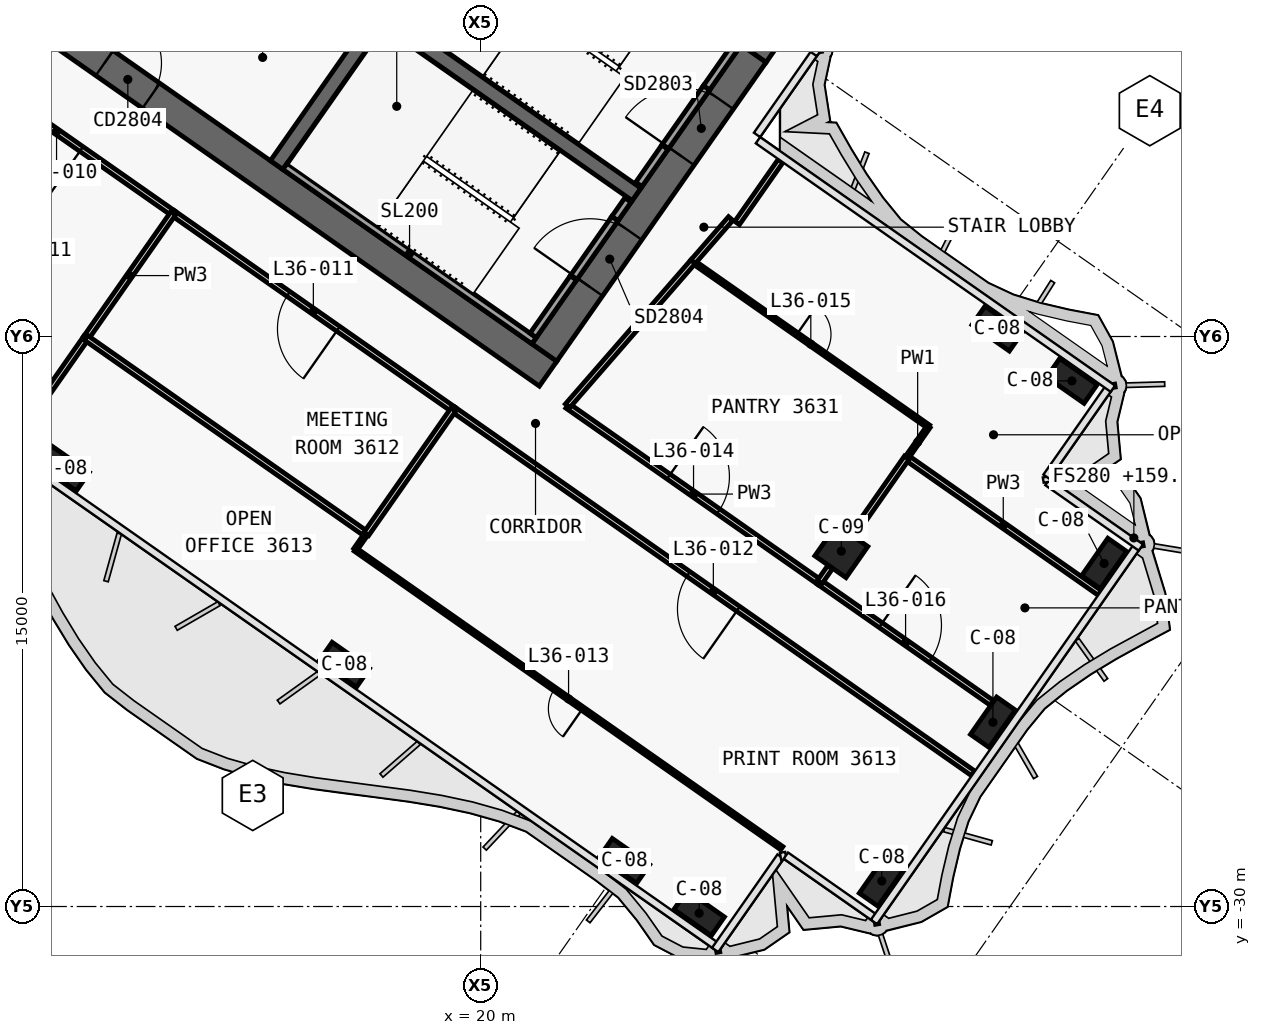
"""IFC4 building model, lengths in metres.
Left out: names, types, materials, properties, quantities, classifications, styles, units other than length and angle.
Written with IfcOpenShell. Run it as: python <this file> out.ifc"""

import sys

from ifc_helpers import new_model, si_unit, direction, frame, frame_2d, origin, origin_2d, place, context, subcontext, project, spatial, polyline, rectangle, outline, extrude, element, fill, save


model = new_model("IFC4")
c1 = context("Model", 3, precision=1e-05, world=origin(), true_north=direction((0.0, 1.0)))
c2 = subcontext(c1, "Body", "Model", "MODEL_VIEW")
j1 = project(units=[si_unit("LENGTHUNIT", "METRE"), si_unit("PLANEANGLEUNIT", "RADIAN")], contexts=[c1])
p1 = place(None, origin())
s1 = spatial("IfcSite", under=j1, at=p1, CompositionType="ELEMENT")
p2 = place(p1, origin())
s2 = spatial("IfcBuilding", under=s1, at=p2, CompositionType="ELEMENT")
p3 = place(p2, frame((0.0, 0.0, 159.3)))
s3 = spatial("IfcBuildingStorey", under=s2, at=p3, CompositionType="ELEMENT", Elevation=159.3)
p4 = place(p3, frame((-0.029, 11.984, 0.0), z_axis=(0.0, 0.0, 1.0), x_axis=(0.819151382952, -0.573577380837, 0.0)))
e1 = element("IfcWall", 1, at=p4, inside=s3, PredefinedType="SHEAR", context=c2, shape_type="SweptSolid", body=[
    extrude(outline(polyline([(33.898, 0.4), (-0.0, 0.4), (0.56, -0.4), (33.898, -0.4), (33.898, 0.4)])), origin(), (0.0, 0.0, 1.0), 3.9),
])
p5 = place(p3, frame((-0.029, -0.712, 0.0), z_axis=(0.0, 0.0, 1.0), x_axis=(0.819151758019, -0.573576845187, 0.0)))
e2 = element("IfcWall", 2, at=p5, inside=s3, PredefinedType="SHEAR", context=c2, shape_type="SweptSolid", body=[
    extrude(outline(polyline([(26.616, 0.4), (-0.0, 0.4), (0.56, -0.4), (26.616, -0.4), (26.616, 0.4)])), origin(), (0.0, 0.0, 1.0), 3.9),
])
p6 = place(p5, frame((0.966, 0.0, 0.0)))
e3 = element("IfcOpeningElement", 3, at=p6, cuts=e2, PredefinedType="OPENING", context=c2, shape_type="SweptSolid", body=[
    extrude(rectangle(XDim=1.5, YDim=2.1, at=frame_2d((0.75, 1.05))), frame((0.0, 0.41, 0.0), z_axis=(0.0, -1.0, 0.0), x_axis=(1.0, 0.0, 0.0)), (0.0, 0.0, 1.0), 0.82),
])
p7 = place(p5, frame((12.366, 0.0, 0.0)))
e4 = element("IfcOpeningElement", 4, at=p7, cuts=e2, PredefinedType="OPENING", context=c2, shape_type="SweptSolid", body=[
    extrude(rectangle(XDim=1.5, YDim=2.1, at=frame_2d((0.75, 1.05))), frame((0.0, 0.41, 0.0), z_axis=(0.0, -1.0, 0.0), x_axis=(1.0, 0.0, 0.0)), (0.0, 0.0, 1.0), 0.82),
])
p8 = place(p3, frame((21.675, -15.421, 0.0), z_axis=(0.0, 0.0, 1.0), x_axis=(0.573581815061, 0.819148278049, 0.0)))
e5 = element("IfcWall", 5, at=p8, inside=s3, PredefinedType="SHEAR", context=c2, shape_type="SweptSolid", body=[
    extrude(outline(polyline([(9.6, 0.4), (0.0, 0.4), (0.0, -0.4), (9.6, -0.4), (9.6, 0.4)])), origin(), (0.0, 0.0, 1.0), 3.9),
])
p9 = place(p8, frame((6.3, 0.0, 0.0)))
e6 = element("IfcOpeningElement", 6, at=p9, cuts=e5, PredefinedType="OPENING", context=c2, shape_type="SweptSolid", body=[
    extrude(rectangle(XDim=1.8, YDim=2.1, at=frame_2d((0.9, 1.05))), frame((0.0, 0.41, 0.0), z_axis=(0.0, -1.0, 0.0), x_axis=(1.0, 0.0, 0.0)), (0.0, 0.0, 1.0), 0.82),
])
p10 = place(p8, frame((2.1, 0.0, 0.0)))
e7 = element("IfcOpeningElement", 7, at=p10, cuts=e5, PredefinedType="OPENING", context=c2, shape_type="SweptSolid", body=[
    extrude(rectangle(XDim=1.8, YDim=2.1, at=frame_2d((0.9, 1.05))), frame((0.0, 0.41, 0.0), z_axis=(0.0, -1.0, 0.0), x_axis=(1.0, 0.0, 0.0)), (0.0, 0.0, 1.0), 0.82),
])
p11 = place(p3, frame((14.63, -10.488, 0.0), z_axis=(0.0, 0.0, 1.0), x_axis=(0.573611936273, 0.819127185829, 0.0)))
e8 = element("IfcWall", 8, at=p11, inside=s3, PredefinedType="SHEAR", context=c2, shape_type="SweptSolid", body=[
    extrude(outline(polyline([(0.0, 0.2), (0.0, -0.2), (4.6, -0.2), (4.6, 0.2), (0.0, 0.2)])), origin(), (0.0, 0.0, 1.0), 3.9),
])
p12 = place(p3, frame((2.638, 3.768, 0.0), z_axis=(0.0, 0.0, 1.0), x_axis=(0.81915267502, -0.573575535572, 0.0)))
e9 = element("IfcWall", 9, at=p12, inside=s3, PredefinedType="SHEAR", context=c2, shape_type="SweptSolid", body=[
    extrude(outline(polyline([(0.0, 0.2), (0.0, -0.2), (26.2, -0.2), (26.2, 0.2), (0.0, 0.2)])), origin(), (0.0, 0.0, 1.0), 3.9),
])
p13 = place(p12, frame((9.637, 0.0, 0.0)))
e10 = element("IfcOpeningElement", 10, at=p13, cuts=e9, PredefinedType="OPENING", context=c2, shape_type="SweptSolid", body=[
    extrude(rectangle(XDim=1.2, YDim=2.1, at=frame_2d((0.6, 1.05))), frame((0.0, 0.21, 0.0), z_axis=(0.0, -1.0, 0.0), x_axis=(1.0, 0.0, 0.0)), (0.0, 0.0, 1.0), 0.42),
])
p14 = place(p12, frame((11.812, 0.0, 0.0)))
e11 = element("IfcOpeningElement", 11, at=p14, cuts=e9, PredefinedType="OPENING", context=c2, shape_type="SweptSolid", body=[
    extrude(rectangle(XDim=1.2, YDim=2.1, at=frame_2d((0.6, 1.05))), frame((0.0, 0.21, 0.0), z_axis=(0.0, -1.0, 0.0), x_axis=(1.0, 0.0, 0.0)), (0.0, 0.0, 1.0), 0.42),
])
p15 = place(p12, frame((13.988, 0.0, 0.0)))
e12 = element("IfcOpeningElement", 12, at=p15, cuts=e9, PredefinedType="OPENING", context=c2, shape_type="SweptSolid", body=[
    extrude(rectangle(XDim=1.2, YDim=2.1, at=frame_2d((0.6, 1.05))), frame((0.0, 0.21, 0.0), z_axis=(0.0, -1.0, 0.0), x_axis=(1.0, 0.0, 0.0)), (0.0, 0.0, 1.0), 0.42),
])
p16 = place(p12, frame((16.262, 0.0, 0.0)))
e13 = element("IfcOpeningElement", 13, at=p16, cuts=e9, PredefinedType="OPENING", context=c2, shape_type="SweptSolid", body=[
    extrude(rectangle(XDim=1.0, YDim=2.1, at=frame_2d((0.5, 1.05))), frame((0.0, 0.21, 0.0), z_axis=(0.0, -1.0, 0.0), x_axis=(1.0, 0.0, 0.0)), (0.0, 0.0, 1.0), 0.42),
])
for number, where, z_axis, x_axis in (
    (14, (9.038, -18.475, 0.0), (0.0, 0.0, 1.0), (0.819, -0.574, 0.0)),
    (15, (16.41, -23.637, 0.0), (0.0, 0.0, 1.0), (0.819, -0.574, 0.0)),
    (16, (23.782, -28.799, 0.0), (0.0, 0.0, 1.0), (0.819, -0.574, 0.0)),
    (17, (25.748, -30.176, 0.0), (0.0, 0.0, 1.0), (0.819, -0.574, 0.0)),
    (18, (33.591, -14.792, 0.0), (0.0, 0.0, 1.0), (0.819, -0.574, 0.0)),
    (19, (35.556, -16.168, 0.0), (0.0, 0.0, 1.0), (0.819, -0.574, 0.0)),
    (20, (30.553, -29.329, 0.0), (0.0, 0.0, 1.0), (0.574, 0.819, 0.0)),
    (21, (33.479, -25.151, 0.0), (0.0, 0.0, 1.0), (0.574, 0.819, 0.0)),
    (22, (36.404, -20.973, 0.0), (0.0, 0.0, 1.0), (0.574, 0.819, 0.0)),
):
    element("IfcColumn", number, at=place(p3, frame(where, z_axis=z_axis, x_axis=x_axis)), inside=s3, PredefinedType="COLUMN", context=c2, shape_type="SweptSolid", body=[
        extrude(rectangle(XDim=1.2, YDim=0.6, at=origin_2d()), origin(), (0.0, 0.0, 1.0), 3.9),
    ])
p17 = place(p3, frame((29.49, -20.649, 0.0), z_axis=(0.0, 0.0, 1.0), x_axis=(0.819152044289, -0.573576436351, 0.0)))
e23 = element("IfcColumn", 23, at=p17, inside=s3, PredefinedType="COLUMN", context=c2, shape_type="SweptSolid", body=[
    extrude(rectangle(XDim=1.0, YDim=1.0, at=origin_2d()), origin(), (0.0, 0.0, 1.0), 3.9),
])
p18 = place(p3, frame((24.162, -10.998, 0.0), z_axis=(0.0, 0.0, 1.0), x_axis=(0.573612502218, 0.819126789514, 0.0)))
e24 = element("IfcWall", 24, at=p18, inside=s3, PredefinedType="SOLIDWALL", context=c2, shape_type="SweptSolid", body=[
    extrude(rectangle(XDim=1.2, YDim=0.2, at=frame_2d((0.6, 0.0))), origin(), (0.0, 0.0, 1.0), 3.62),
])
p19 = place(p3, frame((25.94, -8.458, 0.0), z_axis=(0.0, 0.0, 1.0), x_axis=(0.573619628835, 0.819121798889, 0.0)))
e25 = element("IfcWall", 25, at=p19, inside=s3, PredefinedType="SOLIDWALL", context=c2, shape_type="SweptSolid", body=[
    extrude(rectangle(XDim=1.25, YDim=0.2, at=frame_2d((0.625, 0.0))), origin(), (0.0, 0.0, 1.0), 3.62),
])
p20 = place(p3, frame((24.85, -10.014, 2.15), z_axis=(0.0, 0.0, 1.0), x_axis=(0.573505465124, 0.819201734296, 0.0)))
e26 = element("IfcWall", 26, at=p20, inside=s3, PredefinedType="SOLIDWALL", context=c2, shape_type="SweptSolid", body=[
    extrude(rectangle(XDim=1.9, YDim=0.2, at=frame_2d((0.95, 0.0))), origin(), (0.0, 0.0, 1.0), 1.47),
])
p21 = place(p3, frame((14.851, -10.521, 0.0), z_axis=(0.0, 0.0, 1.0), x_axis=(0.819141584393, -0.57359137434, 0.0)))
e27 = element("IfcWall", 27, at=p21, inside=s3, PredefinedType="SOLIDWALL", context=c2, shape_type="SweptSolid", body=[
    extrude(rectangle(XDim=8.0, YDim=0.2, at=frame_2d((4.0, 0.0))), origin(), (0.0, 0.0, 1.0), 3.62),
])
p22 = place(p3, frame((21.38, -14.97, 0.0), z_axis=(0.0, 0.0, 1.0), x_axis=(0.573559770908, 0.819163713305, 0.0)))
e28 = element("IfcWall", 28, at=p22, inside=s3, PredefinedType="SOLIDWALL", context=c2, shape_type="SweptSolid", body=[
    extrude(rectangle(XDim=1.85, YDim=0.2, at=frame_2d((0.925, 0.0))), origin(), (0.0, 0.0, 1.0), 3.62),
])
p23 = place(p3, frame((23.531, -11.898, 0.0), z_axis=(0.0, 0.0, 1.0), x_axis=(0.573708088123, 0.819059844958, 0.0)))
e29 = element("IfcWall", 29, at=p23, inside=s3, PredefinedType="SOLIDWALL", context=c2, shape_type="SweptSolid", body=[
    extrude(rectangle(XDim=0.6, YDim=0.2, at=frame_2d((0.3, 0.0))), origin(), (0.0, 0.0, 1.0), 3.62),
])
p24 = place(p3, frame((22.441, -13.455, 2.15), z_axis=(0.0, 0.0, 1.0), x_axis=(0.573591692345, 0.819141361715, 0.0)))
e30 = element("IfcWall", 30, at=p24, inside=s3, PredefinedType="SOLIDWALL", context=c2, shape_type="SweptSolid", body=[
    extrude(rectangle(XDim=1.9, YDim=0.2, at=frame_2d((0.95, 0.0))), origin(), (0.0, 0.0, 1.0), 1.47),
])
p25 = place(p3, frame((22.283, -16.824, 0.0), z_axis=(0.0, 0.0, 1.0), x_axis=(0.819158271121, -0.57356754341, 0.0)))
e31 = element("IfcWall", 31, at=p25, inside=s3, PredefinedType="PARTITIONING", context=c2, shape_type="SweptSolid", body=[
    extrude(rectangle(XDim=8.099, YDim=0.15, at=frame_2d((4.049, 0.0))), origin(), (0.0, 0.0, 1.0), 3.0),
])
p26 = place(p25, frame((3.25, 0.0, 0.0)))
e32 = element("IfcOpeningElement", 32, at=p26, cuts=e31, PredefinedType="OPENING", context=c2, shape_type="SweptSolid", body=[
    extrude(rectangle(XDim=1.6, YDim=2.1, at=frame_2d((0.8, 1.05))), frame((0.0, 0.085, 0.0), z_axis=(0.0, -1.0, 0.0), x_axis=(1.0, 0.0, 0.0)), (0.0, 0.0, 1.0), 0.17),
])
p27 = place(p3, frame((28.914, -21.467, 0.0), z_axis=(0.0, 0.0, 1.0), x_axis=(0.819142757108, -0.573589699592, 0.0)))
e33 = element("IfcWall", 33, at=p27, inside=s3, PredefinedType="PARTITIONING", context=c2, shape_type="SweptSolid", body=[
    extrude(rectangle(XDim=5.532, YDim=0.15, at=frame_2d((2.766, 0.0))), origin(), (0.0, 0.0, 1.0), 3.0),
])
p28 = place(p27, frame((1.966, 0.0, 0.0)))
e34 = element("IfcOpeningElement", 34, at=p28, cuts=e33, PredefinedType="OPENING", context=c2, shape_type="SweptSolid", body=[
    extrude(rectangle(XDim=1.6, YDim=2.1, at=frame_2d((0.8, 1.05))), frame((0.0, 0.085, 0.0), z_axis=(0.0, -1.0, 0.0), x_axis=(1.0, 0.0, 0.0)), (0.0, 0.0, 1.0), 0.17),
])
p29 = place(p3, frame((11.912, -11.759, 0.0), z_axis=(0.0, 0.0, 1.0), x_axis=(-0.819150881364, 0.573578097177, 0.0)))
e35 = element("IfcWall", 35, at=p29, inside=s3, PredefinedType="PARTITIONING", context=c2, shape_type="SweptSolid", body=[
    extrude(rectangle(XDim=7.502, YDim=0.15, at=frame_2d((3.751, 0.0))), origin(), (0.0, 0.0, 1.0), 3.0),
])
p30 = place(p29, frame((2.951, 0.0, 0.0)))
e36 = element("IfcOpeningElement", 36, at=p30, cuts=e35, PredefinedType="OPENING", context=c2, shape_type="SweptSolid", body=[
    extrude(rectangle(XDim=1.6, YDim=2.1, at=frame_2d((0.8, 1.05))), frame((0.0, 0.085, 0.0), z_axis=(0.0, -1.0, 0.0), x_axis=(1.0, 0.0, 0.0)), (0.0, 0.0, 1.0), 0.17),
])
p31 = place(p3, frame((19.284, -16.921, 0.0), z_axis=(0.0, 0.0, 1.0), x_axis=(-0.819155480642, 0.5735715287, 0.0)))
e37 = element("IfcWall", 37, at=p31, inside=s3, PredefinedType="PARTITIONING", context=c2, shape_type="SweptSolid", body=[
    extrude(rectangle(XDim=9.004, YDim=0.15, at=frame_2d((4.502, 0.0))), origin(), (0.0, 0.0, 1.0), 3.0),
])
p32 = place(p31, frame((3.702, 0.0, 0.0)))
e38 = element("IfcOpeningElement", 38, at=p32, cuts=e37, PredefinedType="OPENING", context=c2, shape_type="SweptSolid", body=[
    extrude(rectangle(XDim=1.6, YDim=2.1, at=frame_2d((0.8, 1.05))), frame((0.0, 0.085, 0.0), z_axis=(0.0, -1.0, 0.0), x_axis=(1.0, 0.0, 0.0)), (0.0, 0.0, 1.0), 0.17),
])
p33 = place(p3, frame((32.962, -26.499, 0.0), z_axis=(0.0, 0.0, 1.0), x_axis=(-0.819151565135, 0.573577120654, 0.0)))
e39 = element("IfcWall", 39, at=p33, inside=s3, PredefinedType="PARTITIONING", context=c2, shape_type="SweptSolid", body=[
    extrude(rectangle(XDim=16.702, YDim=0.15, at=frame_2d((8.351, 0.0))), origin(), (0.0, 0.0, 1.0), 2.9),
])
p34 = place(p33, frame((7.551, 0.0, 0.0)))
e40 = element("IfcOpeningElement", 40, at=p34, cuts=e39, PredefinedType="OPENING", context=c2, shape_type="SweptSolid", body=[
    extrude(rectangle(XDim=1.6, YDim=2.1, at=frame_2d((0.8, 1.05))), frame((0.0, 0.085, 0.0), z_axis=(0.0, -1.0, 0.0), x_axis=(1.0, 0.0, 0.0)), (0.0, 0.0, 1.0), 0.17),
])
p35 = place(p3, frame((31.784, -17.371, 0.0), z_axis=(0.0, 0.0, 1.0), x_axis=(-0.573708088123, -0.819059844958, 0.0)))
e41 = element("IfcWall", 41, at=p35, inside=s3, PredefinedType="PARTITIONING", context=c2, shape_type="SweptSolid", body=[
    extrude(rectangle(XDim=1.0, YDim=0.1, at=frame_2d((0.5, 0.0))), origin(), (0.0, 0.0, 1.0), 3.0),
])
p36 = place(p3, frame((25.588, -13.032, 0.0), z_axis=(0.0, 0.0, 1.0), x_axis=(0.819151551875, -0.57357713959, 0.0)))
e42 = element("IfcWall", 42, at=p36, inside=s3, PredefinedType="PARTITIONING", context=c2, shape_type="SweptSolid", body=[
    extrude(rectangle(XDim=7.564, YDim=0.1, at=frame_2d((3.782, 0.0))), origin(), (0.0, 0.0, 1.0), 3.0),
])
p37 = place(p36, frame((3.332, 0.0, 0.0)))
e43 = element("IfcOpeningElement", 43, at=p37, cuts=e42, PredefinedType="OPENING", context=c2, shape_type="SweptSolid", body=[
    extrude(rectangle(XDim=0.9, YDim=2.1, at=frame_2d((0.45, 1.05))), frame((0.0, 0.06, 0.0), z_axis=(0.0, -1.0, 0.0), x_axis=(1.0, 0.0, 0.0)), (0.0, 0.0, 1.0), 0.12),
])
p38 = place(p3, frame((36.29, -21.747, 0.0), z_axis=(0.0, 0.0, 1.0), x_axis=(-0.819159766912, 0.573565407145, 0.0)))
e44 = element("IfcWall", 44, at=p38, inside=s3, PredefinedType="PARTITIONING", context=c2, shape_type="SweptSolid", body=[
    extrude(rectangle(XDim=6.2, YDim=0.15, at=frame_2d((3.1, 0.0))), origin(), (0.0, 0.0, 1.0), 2.9),
])
p39 = place(p3, frame((25.588, -13.032, 0.0), z_axis=(0.0, 0.0, 1.0), x_axis=(0.656759948122, 0.754099708621, 0.0)))
e45 = element("IfcWall", 45, at=p39, inside=s3, PredefinedType="PARTITIONING", context=c2, shape_type="SweptSolid", body=[
    extrude(rectangle(XDim=1.507, YDim=0.15, at=frame_2d((0.754, 0.0))), origin(), (0.0, 0.0, 1.0), 3.62),
])
p40 = place(p3, frame((26.746, -12.014, 0.0), z_axis=(0.0, 0.0, 1.0), x_axis=(0.573568836472, 0.819157365729, 0.0)))
e46 = element("IfcWall", 46, at=p40, inside=s3, PredefinedType="PARTITIONING", context=c2, shape_type="SweptSolid", body=[
    extrude(rectangle(XDim=2.0, YDim=0.15, at=frame_2d((1.0, 0.0))), origin(), (0.0, 0.0, 1.0), 3.0),
])
p41 = place(p3, frame((31.211, -18.19, 0.0), z_axis=(0.0, 0.0, 1.0), x_axis=(-0.573620761779, -0.819121005503, 0.0)))
e47 = element("IfcWall", 47, at=p41, inside=s3, PredefinedType="PARTITIONING", context=c2, shape_type="SweptSolid", body=[
    extrude(rectangle(XDim=2.482, YDim=0.15, at=frame_2d((1.241, 0.0))), origin(), (0.0, 0.0, 1.0), 3.0),
])
p42 = place(p3, frame((29.191, -21.075, 0.0), z_axis=(0.0, 0.0, 1.0), x_axis=(-0.57322336738, -0.819399152483, 0.0)))
e48 = element("IfcWall", 48, at=p42, inside=s3, PredefinedType="PARTITIONING", context=c2, shape_type="SweptSolid", body=[
    extrude(rectangle(XDim=0.48, YDim=0.15, at=frame_2d((0.24, 0.0))), origin(), (0.0, 0.0, 1.0), 3.0),
])
p43 = place(p3, frame((22.285, -16.825, 0.0), z_axis=(0.0, 0.0, 1.0), x_axis=(0.656777182061, 0.754084698906, 0.0)))
e49 = element("IfcWall", 49, at=p43, inside=s3, PredefinedType="PARTITIONING", context=c2, shape_type="SweptSolid", body=[
    extrude(rectangle(XDim=5.028, YDim=0.15, at=frame_2d((2.514, 0.0))), origin(), (0.0, 0.0, 1.0), 3.0),
])
p44 = place(p3, frame((11.91, -11.758, 0.0), z_axis=(0.0, 0.0, 1.0), x_axis=(-0.573560601885, -0.819163131473, 0.0)))
e50 = element("IfcWall", 50, at=p44, inside=s3, PredefinedType="PARTITIONING", context=c2, shape_type="SweptSolid", body=[
    extrude(rectangle(XDim=4.002, YDim=0.15, at=frame_2d((2.001, 0.0))), origin(), (0.0, 0.0, 1.0), 3.62),
])
p45 = place(p3, frame((9.616, -15.033, 0.0), z_axis=(0.0, 0.0, 1.0), x_axis=(-0.573560622794, -0.819163116834, 0.0)))
e51 = element("IfcWall", 51, at=p45, inside=s3, PredefinedType="PARTITIONING", context=c2, shape_type="SweptSolid", body=[
    extrude(rectangle(XDim=3.501, YDim=0.15, at=frame_2d((1.75, 0.0))), origin(), (0.0, 0.0, 1.0), 2.9),
])
p46 = place(p3, frame((16.988, -20.196, 0.0), z_axis=(0.0, 0.0, 1.0), x_axis=(-0.819154173185, 0.573573395961, 0.0)))
e52 = element("IfcWall", 52, at=p46, inside=s3, PredefinedType="PARTITIONING", context=c2, shape_type="SweptSolid", body=[
    extrude(rectangle(XDim=9.0, YDim=0.15, at=frame_2d((4.5, 0.0))), origin(), (0.0, 0.0, 1.0), 3.0),
])
p47 = place(p3, frame((19.282, -16.92, 0.0), z_axis=(0.0, 0.0, 1.0), x_axis=(-0.573626190743, -0.819117203636, 0.0)))
e53 = element("IfcWall", 53, at=p47, inside=s3, PredefinedType="PARTITIONING", context=c2, shape_type="SweptSolid", body=[
    extrude(rectangle(XDim=4.0, YDim=0.15, at=frame_2d((2.0, 0.0))), origin(), (0.0, 0.0, 1.0), 3.62),
])
p48 = place(p3, frame((16.701, -20.607, 0.0), z_axis=(0.0, 0.0, 1.0), x_axis=(0.573822822947, 0.818979467304, 0.0)))
e54 = element("IfcWall", 54, at=p48, inside=s3, PredefinedType="PARTITIONING", context=c2, shape_type="SweptSolid", body=[
    extrude(rectangle(XDim=0.5, YDim=0.1, at=frame_2d((0.25, 0.0))), origin(), (0.0, 0.0, 1.0), 3.62),
])
p49 = place(p3, frame((27.923, -28.465, 0.0), z_axis=(0.0, 0.0, 1.0), x_axis=(-0.81914735472, 0.573583133691, 0.0)))
e55 = element("IfcWall", 55, at=p49, inside=s3, PredefinedType="PARTITIONING", context=c2, shape_type="SweptSolid", body=[
    extrude(rectangle(XDim=13.7, YDim=0.1, at=frame_2d((6.85, 0.0))), origin(), (0.0, 0.0, 1.0), 3.0),
])
p50 = place(p49, frame((6.4, 0.0, 0.0)))
e56 = element("IfcOpeningElement", 56, at=p50, cuts=e55, PredefinedType="OPENING", context=c2, shape_type="SweptSolid", body=[
    extrude(rectangle(XDim=0.9, YDim=2.1, at=frame_2d((0.45, 1.05))), frame((0.0, 0.06, 0.0), z_axis=(0.0, -1.0, 0.0), x_axis=(1.0, 0.0, 0.0)), (0.0, 0.0, 1.0), 0.12),
])
p51 = place(p7, origin())
e57 = element("IfcDoor", 57, at=p51, inside=s3, OperationType="DOUBLE_DOOR_SINGLE_SWING", PredefinedType="DOOR", context=c2, shape_type="SweptSolid", body=[
    extrude(rectangle(XDim=1.5, YDim=2.1, at=frame_2d((0.75, 1.05))), frame((0.0, 0.025, 0.0), z_axis=(0.0, -1.0, 0.0), x_axis=(1.0, 0.0, 0.0)), (0.0, 0.0, 1.0), 0.05),
])
fill(e4, e57)
p52 = place(p9, origin())
e58 = element("IfcDoor", 58, at=p52, inside=s3, OperationType="DOUBLE_DOOR_SINGLE_SWING", PredefinedType="DOOR", context=c2, shape_type="SweptSolid", body=[
    extrude(rectangle(XDim=1.8, YDim=2.1, at=frame_2d((0.9, 1.05))), frame((0.0, 0.025, 0.0), z_axis=(0.0, -1.0, 0.0), x_axis=(1.0, 0.0, 0.0)), (0.0, 0.0, 1.0), 0.05),
])
fill(e6, e58)
p53 = place(p10, origin())
e59 = element("IfcDoor", 59, at=p53, inside=s3, OperationType="DOUBLE_DOOR_SINGLE_SWING", PredefinedType="DOOR", context=c2, shape_type="SweptSolid", body=[
    extrude(rectangle(XDim=1.8, YDim=2.1, at=frame_2d((0.9, 1.05))), frame((0.0, 0.025, 0.0), z_axis=(0.0, -1.0, 0.0), x_axis=(1.0, 0.0, 0.0)), (0.0, 0.0, 1.0), 0.05),
])
fill(e7, e59)
p54 = place(p30, origin())
e60 = element("IfcDoor", 60, at=p54, inside=s3, OperationType="DOUBLE_DOOR_SINGLE_SWING", PredefinedType="DOOR", context=c2, shape_type="SweptSolid", body=[
    extrude(rectangle(XDim=1.6, YDim=2.1, at=frame_2d((0.8, 1.05))), frame((0.0, 0.025, 0.0), z_axis=(0.0, -1.0, 0.0), x_axis=(1.0, 0.0, 0.0)), (0.0, 0.0, 1.0), 0.05),
])
fill(e36, e60)
p55 = place(p32, origin())
e61 = element("IfcDoor", 61, at=p55, inside=s3, OperationType="DOUBLE_DOOR_SINGLE_SWING", PredefinedType="DOOR", context=c2, shape_type="SweptSolid", body=[
    extrude(rectangle(XDim=1.6, YDim=2.1, at=frame_2d((0.8, 1.05))), frame((0.0, 0.025, 0.0), z_axis=(0.0, -1.0, 0.0), x_axis=(1.0, 0.0, 0.0)), (0.0, 0.0, 1.0), 0.05),
])
fill(e38, e61)
p56 = place(p34, origin())
e62 = element("IfcDoor", 62, at=p56, inside=s3, OperationType="DOUBLE_DOOR_SINGLE_SWING", PredefinedType="DOOR", context=c2, shape_type="SweptSolid", body=[
    extrude(rectangle(XDim=1.6, YDim=2.1, at=frame_2d((0.8, 1.05))), frame((0.0, 0.025, 0.0), z_axis=(0.0, -1.0, 0.0), x_axis=(1.0, 0.0, 0.0)), (0.0, 0.0, 1.0), 0.05),
])
fill(e40, e62)
p57 = place(p50, origin())
e63 = element("IfcDoor", 63, at=p57, inside=s3, OperationType="SINGLE_SWING_RIGHT", PredefinedType="DOOR", context=c2, shape_type="SweptSolid", body=[
    extrude(rectangle(XDim=0.9, YDim=2.1, at=frame_2d((0.45, 1.05))), frame((0.0, 0.025, 0.0), z_axis=(0.0, -1.0, 0.0), x_axis=(1.0, 0.0, 0.0)), (0.0, 0.0, 1.0), 0.05),
])
fill(e56, e63)
p58 = place(p26, origin())
e64 = element("IfcDoor", 64, at=p58, inside=s3, OperationType="DOUBLE_DOOR_SINGLE_SWING", PredefinedType="DOOR", context=c2, shape_type="SweptSolid", body=[
    extrude(rectangle(XDim=1.6, YDim=2.1, at=frame_2d((0.8, 1.05))), frame((0.0, 0.025, 0.0), z_axis=(0.0, -1.0, 0.0), x_axis=(1.0, 0.0, 0.0)), (0.0, 0.0, 1.0), 0.05),
])
fill(e32, e64)
p59 = place(p37, origin())
e65 = element("IfcDoor", 65, at=p59, inside=s3, OperationType="SINGLE_SWING_LEFT", PredefinedType="DOOR", context=c2, shape_type="SweptSolid", body=[
    extrude(rectangle(XDim=0.9, YDim=2.1, at=frame_2d((0.45, 1.05))), frame((0.0, 0.025, 0.0), z_axis=(0.0, -1.0, 0.0), x_axis=(1.0, 0.0, 0.0)), (0.0, 0.0, 1.0), 0.05),
])
fill(e43, e65)
p60 = place(p28, origin())
e66 = element("IfcDoor", 66, at=p60, inside=s3, OperationType="DOUBLE_DOOR_SINGLE_SWING", PredefinedType="DOOR", context=c2, shape_type="SweptSolid", body=[
    extrude(rectangle(XDim=1.6, YDim=2.1, at=frame_2d((0.8, 1.05))), frame((0.0, 0.025, 0.0), z_axis=(0.0, -1.0, 0.0), x_axis=(1.0, 0.0, 0.0)), (0.0, 0.0, 1.0), 0.05),
])
fill(e34, e66)
save(model, sys.argv[1])
